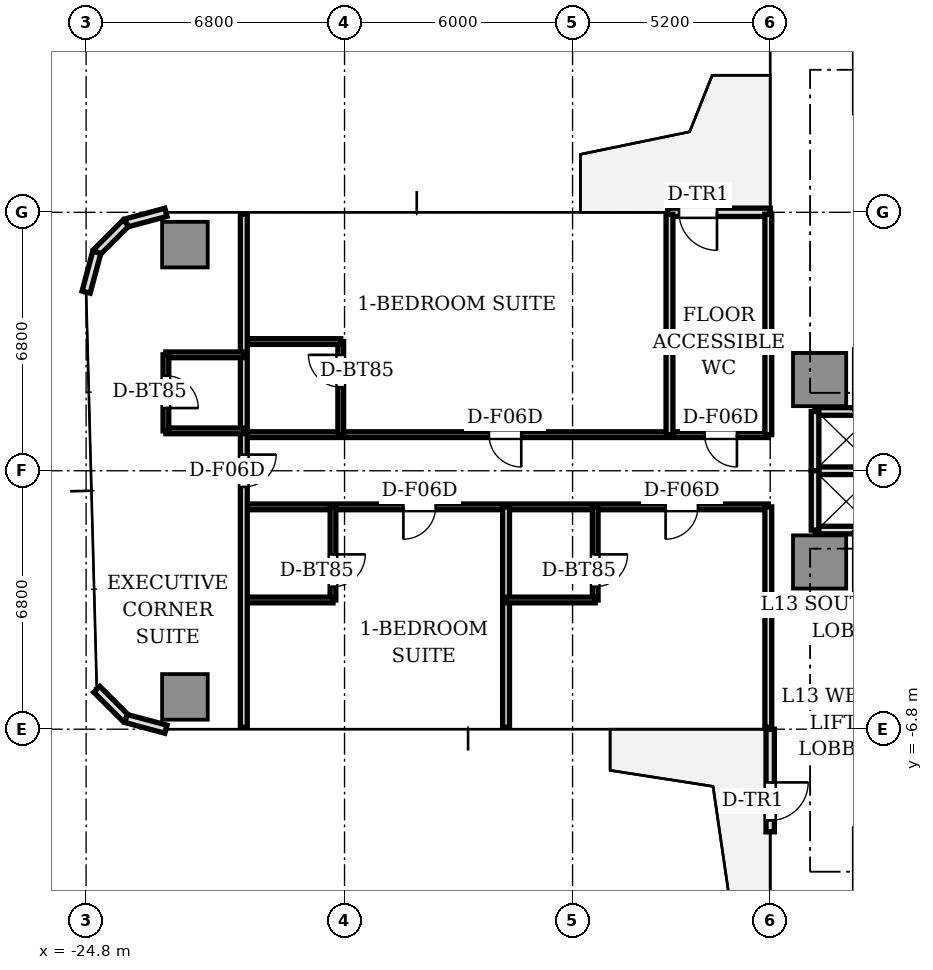
"""IFC4 building model, lengths in metres.
Left out: names, types, materials, properties, quantities, classifications, styles, units other than length and angle.
Written with IfcOpenShell. Run it as: python <this file> out.ifc"""

import sys

from ifc_helpers import new_model, si_unit, direction, frame, frame_2d, origin, origin_2d, place, context, subcontext, project, spatial, rectangle, extrude, source, transform, mapped, element, fill, save


model = new_model("IFC4")
c1 = context("Model", 3, precision=1e-05, world=origin(), true_north=direction((0.0, 1.0)))
c2 = subcontext(c1, "Body", "Model", "MODEL_VIEW")
j1 = project(units=[si_unit("LENGTHUNIT", "METRE"), si_unit("PLANEANGLEUNIT", "RADIAN")], contexts=[c1])
p1 = place(None, origin())
s1 = spatial("IfcSite", under=j1, at=p1, CompositionType="ELEMENT")
p2 = place(p1, origin())
s2 = spatial("IfcBuilding", under=s1, at=p2, CompositionType="ELEMENT")
p3 = place(p2, frame((0.0, 0.0, 51.05)))
s3 = spatial("IfcBuildingStorey", under=s2, at=p3, CompositionType="ELEMENT", Elevation=51.05)
m1 = source(origin(), c2, "Body", "SweptSolid", [
    extrude(rectangle(XDim=1.4, YDim=1.4, at=origin_2d()), origin(), (0.0, 0.0, 1.0), 3.11),
])
for number, where, z_axis, x_axis in (
    (1, (-5.5, 2.4, 0.0), (0.0, 0.0, 1.0), (1.0, 0.0, 0.0)),
    (2, (-5.5, -2.4, 0.0), (0.0, 0.0, 1.0), (1.0, 0.0, 0.0)),
):
    element("IfcColumn", number, at=place(p3, frame(where, z_axis=z_axis, x_axis=x_axis)), inside=s3, PredefinedType="COLUMN", context=c2, shape_type="MappedRepresentation", body=[
        mapped(m1, transform((0.0, 0.0, 0.0), scale=1.0)),
    ])
m2 = source(origin(), c2, "Body", "SweptSolid", [
    extrude(rectangle(XDim=1.2, YDim=1.2, at=origin_2d()), origin(), (0.0, 0.0, 1.0), 3.11),
])
for number, where, z_axis, x_axis in (
    (3, (-22.2, 5.95, 0.0), (0.0, 0.0, 1.0), (1.0, 0.0, 0.0)),
    (4, (-22.2, -5.95, 0.0), (0.0, 0.0, 1.0), (1.0, 0.0, 0.0)),
):
    element("IfcColumn", number, at=place(p3, frame(where, z_axis=z_axis, x_axis=x_axis)), inside=s3, PredefinedType="COLUMN", context=c2, shape_type="MappedRepresentation", body=[
        mapped(m2, transform((0.0, 0.0, 0.0), scale=1.0)),
    ])
p4 = place(p3, frame((-6.8, 6.8, 0.0), z_axis=(0.0, 0.0, 1.0), x_axis=(-1.0, 0.0, 0.0)))
e5 = element("IfcWall", 5, at=p4, inside=s3, PredefinedType="STANDARD", context=c2, shape_type="SweptSolid", body=[
    extrude(rectangle(XDim=2.7, YDim=0.22, at=frame_2d((1.35, 0.0))), origin(), (0.0, 0.0, 1.0), 3.11),
])
p5 = place(p4, frame((1.4, 0.0, 0.0)))
e6 = element("IfcOpeningElement", 6, at=p5, cuts=e5, PredefinedType="OPENING", context=c2, shape_type="SweptSolid", body=[
    extrude(rectangle(XDim=1.0, YDim=2.2, at=frame_2d((0.5, 1.1))), frame((0.0, 0.12, 0.0), z_axis=(0.0, -1.0, 0.0), x_axis=(1.0, 0.0, 0.0)), (0.0, 0.0, 1.0), 0.24),
])
for number, where, z_axis, x_axis in (
    (7, (-22.7, 6.8, 0.0), (0.0, 0.0, 1.0), (-0.966, -0.259, 0.0)),
    (8, (-23.75, 6.519, 0.0), (0.0, 0.0, 1.0), (-0.707, -0.707, 0.0)),
    (9, (-24.519, 5.75, 0.0), (0.0, 0.0, 1.0), (-0.259, -0.966, 0.0)),
    (10, (-24.519, -5.75, 0.0), (0.0, 0.0, 1.0), (0.707, -0.707, 0.0)),
    (11, (-23.75, -6.519, 0.0), (0.0, 0.0, 1.0), (0.966, -0.259, 0.0)),
):
    element("IfcWall", number, at=place(p3, frame(where, z_axis=z_axis, x_axis=x_axis)), inside=s3, PredefinedType="STANDARD", context=c2, shape_type="SweptSolid", body=[
        extrude(rectangle(XDim=1.087, YDim=0.22, at=frame_2d((0.543, 0.0))), origin(), (0.0, 0.0, 1.0), 3.11),
    ])
p6 = place(p3, frame((-6.8, -6.8, 0.0), z_axis=(0.0, 0.0, 1.0), x_axis=(0.0, -1.0, 0.0)))
e12 = element("IfcWall", 12, at=p6, inside=s3, PredefinedType="STANDARD", context=c2, shape_type="SweptSolid", body=[
    extrude(rectangle(XDim=2.7, YDim=0.22, at=frame_2d((1.35, 0.0))), origin(), (0.0, 0.0, 1.0), 3.11),
])
p7 = place(p6, frame((1.4, 0.0, 0.0)))
e13 = element("IfcOpeningElement", 13, at=p7, cuts=e12, PredefinedType="OPENING", context=c2, shape_type="SweptSolid", body=[
    extrude(rectangle(XDim=1.0, YDim=2.2, at=frame_2d((0.5, 1.1))), frame((0.0, 0.12, 0.0), z_axis=(0.0, -1.0, 0.0), x_axis=(1.0, 0.0, 0.0)), (0.0, 0.0, 1.0), 0.24),
])
for number, where, z_axis, x_axis in (
    (14, (-5.62, 1.56, 0.0), (0.0, 0.0, 1.0), (1.0, 0.0, 0.0)),
    (15, (-5.62, -1.56, 0.0), (0.0, 0.0, 1.0), (1.0, 0.0, 0.0)),
    (16, (-5.62, 0.0, 0.0), (0.0, 0.0, 1.0), (1.0, 0.0, 0.0)),
):
    element("IfcWall", number, at=place(p3, frame(where, z_axis=z_axis, x_axis=x_axis)), inside=s3, PredefinedType="SOLIDWALL", context=c2, shape_type="SweptSolid", body=[
        extrude(rectangle(XDim=1.64, YDim=0.2, at=frame_2d((0.82, 0.0))), origin(), (0.0, 0.0, 1.0), 2.66),
    ])
for number, where, z_axis, x_axis in (
    (17, (-5.62, 0.0, 0.0), (0.0, 0.0, 1.0), (0.0, 1.0, 0.0)),
    (18, (-5.62, -1.56, 0.0), (0.0, 0.0, 1.0), (0.0, 1.0, 0.0)),
):
    element("IfcWall", number, at=place(p3, frame(where, z_axis=z_axis, x_axis=x_axis)), inside=s3, PredefinedType="SOLIDWALL", context=c2, shape_type="SweptSolid", body=[
        extrude(rectangle(XDim=1.56, YDim=0.2, at=frame_2d((0.78, 0.0))), origin(), (0.0, 0.0, 1.0), 2.66),
    ])
p8 = place(p3, frame((-6.85, -0.95, 0.0), z_axis=(0.0, 0.0, 1.0), x_axis=(-1.0, 0.0, 0.0)))
e19 = element("IfcWall", 19, at=p8, inside=s3, PredefinedType="PARTITIONING", context=c2, shape_type="SweptSolid", body=[
    extrude(rectangle(XDim=13.8, YDim=0.15, at=frame_2d((6.9, 0.0))), origin(), (0.0, 0.0, 1.0), 2.66),
])
p9 = place(p8, frame((1.852, 0.0, 0.0)))
e20 = element("IfcOpeningElement", 20, at=p9, cuts=e19, PredefinedType="OPENING", context=c2, shape_type="SweptSolid", body=[
    extrude(rectangle(XDim=0.85, YDim=2.1, at=frame_2d((0.425, 1.05))), frame((0.0, 0.085, 0.0), z_axis=(0.0, -1.0, 0.0), x_axis=(1.0, 0.0, 0.0)), (0.0, 0.0, 1.0), 0.17),
])
p10 = place(p8, frame((8.752, 0.0, 0.0)))
e21 = element("IfcOpeningElement", 21, at=p10, cuts=e19, PredefinedType="OPENING", context=c2, shape_type="SweptSolid", body=[
    extrude(rectangle(XDim=0.85, YDim=2.1, at=frame_2d((0.425, 1.05))), frame((0.0, 0.085, 0.0), z_axis=(0.0, -1.0, 0.0), x_axis=(1.0, 0.0, 0.0)), (0.0, 0.0, 1.0), 0.17),
])
p11 = place(p3, frame((-6.85, 0.95, 0.0), z_axis=(0.0, 0.0, 1.0), x_axis=(-1.0, 0.0, 0.0)))
e22 = element("IfcWall", 22, at=p11, inside=s3, PredefinedType="PARTITIONING", context=c2, shape_type="SweptSolid", body=[
    extrude(rectangle(XDim=13.8, YDim=0.15, at=frame_2d((6.9, 0.0))), origin(), (0.0, 0.0, 1.0), 2.66),
])
p12 = place(p11, frame((0.825, 0.0, 0.0)))
e23 = element("IfcOpeningElement", 23, at=p12, cuts=e22, PredefinedType="OPENING", context=c2, shape_type="SweptSolid", body=[
    extrude(rectangle(XDim=0.85, YDim=2.1, at=frame_2d((0.425, 1.05))), frame((0.0, 0.085, 0.0), z_axis=(0.0, -1.0, 0.0), x_axis=(1.0, 0.0, 0.0)), (0.0, 0.0, 1.0), 0.17),
])
p13 = place(p11, frame((6.5, 0.0, 0.0)))
e24 = element("IfcOpeningElement", 24, at=p13, cuts=e22, PredefinedType="OPENING", context=c2, shape_type="SweptSolid", body=[
    extrude(rectangle(XDim=0.85, YDim=2.1, at=frame_2d((0.425, 1.05))), frame((0.0, 0.085, 0.0), z_axis=(0.0, -1.0, 0.0), x_axis=(1.0, 0.0, 0.0)), (0.0, 0.0, 1.0), 0.17),
])
for number, where, z_axis, x_axis in (
    (25, (-6.85, -0.95, 0.0), (0.0, 0.0, 1.0), (0.0, -1.0, 0.0)),
    (26, (-6.85, 6.75, 0.0), (0.0, 0.0, 1.0), (0.0, -1.0, 0.0)),
    (27, (-13.75, -0.95, 0.0), (0.0, 0.0, 1.0), (0.0, -1.0, 0.0)),
):
    element("IfcWall", number, at=place(p3, frame(where, z_axis=z_axis, x_axis=x_axis)), inside=s3, PredefinedType="PARTITIONING", context=c2, shape_type="SweptSolid", body=[
        extrude(rectangle(XDim=5.8, YDim=0.18, at=frame_2d((2.9, 0.0))), origin(), (0.0, 0.0, 1.0), 2.66),
    ])
p14 = place(p3, frame((-11.404, -0.95, 0.0), z_axis=(0.0, 0.0, 1.0), x_axis=(0.0, -1.0, 0.0)))
e28 = element("IfcWall", 28, at=p14, inside=s3, PredefinedType="PARTITIONING", context=c2, shape_type="SweptSolid", body=[
    extrude(rectangle(XDim=2.45, YDim=0.15, at=frame_2d((1.225, 0.0))), origin(), (0.0, 0.0, 1.0), 2.66),
])
p15 = place(p14, frame((1.25, 0.0, 0.0)))
e29 = element("IfcOpeningElement", 29, at=p15, cuts=e28, PredefinedType="OPENING", context=c2, shape_type="SweptSolid", body=[
    extrude(rectangle(XDim=0.85, YDim=2.1, at=frame_2d((0.425, 1.05))), frame((0.0, 0.085, 0.0), z_axis=(0.0, -1.0, 0.0), x_axis=(1.0, 0.0, 0.0)), (0.0, 0.0, 1.0), 0.17),
])
p16 = place(p3, frame((-11.404, -3.4, 0.0), z_axis=(0.0, 0.0, 1.0), x_axis=(-1.0, 0.0, 0.0)))
e30 = element("IfcWall", 30, at=p16, inside=s3, PredefinedType="PARTITIONING", context=c2, shape_type="SweptSolid", body=[
    extrude(rectangle(XDim=2.346, YDim=0.15, at=frame_2d((1.173, 0.0))), origin(), (0.0, 0.0, 1.0), 2.63),
])
p17 = place(p3, frame((-18.304, -0.95, 0.0), z_axis=(0.0, 0.0, 1.0), x_axis=(0.0, -1.0, 0.0)))
e31 = element("IfcWall", 31, at=p17, inside=s3, PredefinedType="PARTITIONING", context=c2, shape_type="SweptSolid", body=[
    extrude(rectangle(XDim=2.45, YDim=0.15, at=frame_2d((1.225, 0.0))), origin(), (0.0, 0.0, 1.0), 2.66),
])
p18 = place(p17, frame((1.25, 0.0, 0.0)))
e32 = element("IfcOpeningElement", 32, at=p18, cuts=e31, PredefinedType="OPENING", context=c2, shape_type="SweptSolid", body=[
    extrude(rectangle(XDim=0.85, YDim=2.1, at=frame_2d((0.425, 1.05))), frame((0.0, 0.085, 0.0), z_axis=(0.0, -1.0, 0.0), x_axis=(1.0, 0.0, 0.0)), (0.0, 0.0, 1.0), 0.17),
])
p19 = place(p3, frame((-18.304, -3.4, 0.0), z_axis=(0.0, 0.0, 1.0), x_axis=(-1.0, 0.0, 0.0)))
e33 = element("IfcWall", 33, at=p19, inside=s3, PredefinedType="PARTITIONING", context=c2, shape_type="SweptSolid", body=[
    extrude(rectangle(XDim=2.346, YDim=0.15, at=frame_2d((1.173, 0.0))), origin(), (0.0, 0.0, 1.0), 2.63),
])
p20 = place(p3, frame((-9.45, 0.95, 0.0), z_axis=(0.0, 0.0, 1.0), x_axis=(0.0, 1.0, 0.0)))
e34 = element("IfcWall", 34, at=p20, inside=s3, PredefinedType="PARTITIONING", context=c2, shape_type="SweptSolid", body=[
    extrude(rectangle(XDim=5.8, YDim=0.18, at=frame_2d((2.9, 0.0))), origin(), (0.0, 0.0, 1.0), 2.66),
])
p21 = place(p3, frame((-18.1, 0.95, 0.0), z_axis=(0.0, 0.0, 1.0), x_axis=(0.0, 1.0, 0.0)))
e35 = element("IfcWall", 35, at=p21, inside=s3, PredefinedType="PARTITIONING", context=c2, shape_type="SweptSolid", body=[
    extrude(rectangle(XDim=2.45, YDim=0.15, at=frame_2d((1.225, 0.0))), origin(), (0.0, 0.0, 1.0), 2.66),
])
p22 = place(p21, frame((1.25, 0.0, 0.0)))
e36 = element("IfcOpeningElement", 36, at=p22, cuts=e35, PredefinedType="OPENING", context=c2, shape_type="SweptSolid", body=[
    extrude(rectangle(XDim=0.85, YDim=2.1, at=frame_2d((0.425, 1.05))), frame((0.0, 0.085, 0.0), z_axis=(0.0, -1.0, 0.0), x_axis=(1.0, 0.0, 0.0)), (0.0, 0.0, 1.0), 0.17),
])
p23 = place(p3, frame((-18.1, 3.4, 0.0), z_axis=(0.0, 0.0, 1.0), x_axis=(-1.0, 0.0, 0.0)))
e37 = element("IfcWall", 37, at=p23, inside=s3, PredefinedType="PARTITIONING", context=c2, shape_type="SweptSolid", body=[
    extrude(rectangle(XDim=2.55, YDim=0.15, at=frame_2d((1.275, 0.0))), origin(), (0.0, 0.0, 1.0), 2.63),
])
p24 = place(p3, frame((-20.65, 6.75, 0.0), z_axis=(0.0, 0.0, 1.0), x_axis=(0.0, -1.0, 0.0)))
e38 = element("IfcWall", 38, at=p24, inside=s3, PredefinedType="PARTITIONING", context=c2, shape_type="SweptSolid", body=[
    extrude(rectangle(XDim=13.5, YDim=0.18, at=frame_2d((6.75, 0.0))), origin(), (0.0, 0.0, 1.0), 2.66),
])
p25 = place(p24, frame((6.325, 0.0, 0.0)))
e39 = element("IfcOpeningElement", 39, at=p25, cuts=e38, PredefinedType="OPENING", context=c2, shape_type="SweptSolid", body=[
    extrude(rectangle(XDim=0.85, YDim=2.1, at=frame_2d((0.425, 1.05))), frame((0.0, 0.1, 0.0), z_axis=(0.0, -1.0, 0.0), x_axis=(1.0, 0.0, 0.0)), (0.0, 0.0, 1.0), 0.2),
])
p26 = place(p3, frame((-20.65, 1.05, 0.0), z_axis=(0.0, 0.0, 1.0), x_axis=(-1.0, 0.0, 0.0)))
e40 = element("IfcWall", 40, at=p26, inside=s3, PredefinedType="PARTITIONING", context=c2, shape_type="SweptSolid", body=[
    extrude(rectangle(XDim=2.05, YDim=0.15, at=frame_2d((1.025, 0.0))), origin(), (0.0, 0.0, 1.0), 2.66),
])
p27 = place(p3, frame((-20.65, 3.05, 0.0), z_axis=(0.0, 0.0, 1.0), x_axis=(-1.0, 0.0, 0.0)))
e41 = element("IfcWall", 41, at=p27, inside=s3, PredefinedType="PARTITIONING", context=c2, shape_type="SweptSolid", body=[
    extrude(rectangle(XDim=2.05, YDim=0.15, at=frame_2d((1.025, 0.0))), origin(), (0.0, 0.0, 1.0), 2.63),
])
p28 = place(p3, frame((-22.7, 3.05, 0.0), z_axis=(0.0, 0.0, 1.0), x_axis=(0.0, -1.0, 0.0)))
e42 = element("IfcWall", 42, at=p28, inside=s3, PredefinedType="PARTITIONING", context=c2, shape_type="SweptSolid", body=[
    extrude(rectangle(XDim=2.0, YDim=0.15, at=frame_2d((1.0, 0.0))), origin(), (0.0, 0.0, 1.0), 2.66),
])
p29 = place(p28, frame((0.55, 0.0, 0.0)))
e43 = element("IfcOpeningElement", 43, at=p29, cuts=e42, PredefinedType="OPENING", context=c2, shape_type="SweptSolid", body=[
    extrude(rectangle(XDim=0.85, YDim=2.1, at=frame_2d((0.425, 1.05))), frame((0.0, 0.085, 0.0), z_axis=(0.0, -1.0, 0.0), x_axis=(1.0, 0.0, 0.0)), (0.0, 0.0, 1.0), 0.17),
])
m3 = source(origin(), c2, "Body", "SweptSolid", [
    extrude(rectangle(XDim=1.0, YDim=0.05, at=origin_2d()), origin(), (0.0, 0.0, 1.0), 2.2),
])
p30 = place(p5, frame((0.5, 0.0, 0.0)))
e44 = element("IfcDoor", 44, at=p30, inside=s3, OperationType="SINGLE_SWING_LEFT", PredefinedType="DOOR", context=c2, shape_type="MappedRepresentation", body=[
    mapped(m3, transform((0.0, 0.0, 0.0), scale=1.0)),
])
fill(e6, e44)
p31 = place(p7, frame((0.5, 0.0, 0.0)))
e45 = element("IfcDoor", 45, at=p31, inside=s3, OperationType="SINGLE_SWING_LEFT", PredefinedType="DOOR", context=c2, shape_type="MappedRepresentation", body=[
    mapped(m3, transform((0.0, 0.0, 0.0), scale=1.0)),
])
fill(e13, e45)
m4 = source(origin(), c2, "Body", "SweptSolid", [
    extrude(rectangle(XDim=0.85, YDim=0.05, at=origin_2d()), origin(), (0.0, 0.0, 1.0), 2.1),
])
p32 = place(p15, frame((0.425, 0.0, 0.0)))
e46 = element("IfcDoor", 46, at=p32, inside=s3, OperationType="SINGLE_SWING_LEFT", PredefinedType="DOOR", context=c2, shape_type="MappedRepresentation", body=[
    mapped(m4, transform((0.0, 0.0, 0.0), scale=1.0)),
])
fill(e29, e46)
p33 = place(p9, frame((0.425, 0.0, 0.0)))
e47 = element("IfcDoor", 47, at=p33, inside=s3, OperationType="SINGLE_SWING_RIGHT", PredefinedType="DOOR", context=c2, shape_type="MappedRepresentation", body=[
    mapped(m4, transform((0.0, 0.0, 0.0), scale=1.0)),
])
fill(e20, e47)
p34 = place(p18, frame((0.425, 0.0, 0.0)))
e48 = element("IfcDoor", 48, at=p34, inside=s3, OperationType="SINGLE_SWING_LEFT", PredefinedType="DOOR", context=c2, shape_type="MappedRepresentation", body=[
    mapped(m4, transform((0.0, 0.0, 0.0), scale=1.0)),
])
fill(e32, e48)
p35 = place(p10, frame((0.425, 0.0, 0.0)))
e49 = element("IfcDoor", 49, at=p35, inside=s3, OperationType="SINGLE_SWING_RIGHT", PredefinedType="DOOR", context=c2, shape_type="MappedRepresentation", body=[
    mapped(m4, transform((0.0, 0.0, 0.0), scale=1.0)),
])
fill(e21, e49)
p36 = place(p12, frame((0.425, 0.0, 0.0)))
e50 = element("IfcDoor", 50, at=p36, inside=s3, OperationType="SINGLE_SWING_LEFT", PredefinedType="DOOR", context=c2, shape_type="MappedRepresentation", body=[
    mapped(m4, transform((0.0, 0.0, 0.0), scale=1.0)),
])
fill(e23, e50)
p37 = place(p22, frame((0.425, 0.0, 0.0)))
e51 = element("IfcDoor", 51, at=p37, inside=s3, OperationType="SINGLE_SWING_RIGHT", PredefinedType="DOOR", context=c2, shape_type="MappedRepresentation", body=[
    mapped(m4, transform((0.0, 0.0, 0.0), scale=1.0)),
])
fill(e36, e51)
p38 = place(p13, frame((0.425, 0.0, 0.0)))
e52 = element("IfcDoor", 52, at=p38, inside=s3, OperationType="SINGLE_SWING_LEFT", PredefinedType="DOOR", context=c2, shape_type="MappedRepresentation", body=[
    mapped(m4, transform((0.0, 0.0, 0.0), scale=1.0)),
])
fill(e24, e52)
p39 = place(p29, frame((0.425, 0.0, 0.0)))
e53 = element("IfcDoor", 53, at=p39, inside=s3, OperationType="SINGLE_SWING_RIGHT", PredefinedType="DOOR", context=c2, shape_type="MappedRepresentation", body=[
    mapped(m4, transform((0.0, 0.0, 0.0), scale=1.0)),
])
fill(e43, e53)
p40 = place(p25, frame((0.425, 0.0, 0.0)))
e54 = element("IfcDoor", 54, at=p40, inside=s3, OperationType="SINGLE_SWING_LEFT", PredefinedType="DOOR", context=c2, shape_type="MappedRepresentation", body=[
    mapped(m4, transform((0.0, 0.0, 0.0), scale=1.0)),
])
fill(e39, e54)
save(model, sys.argv[1])
